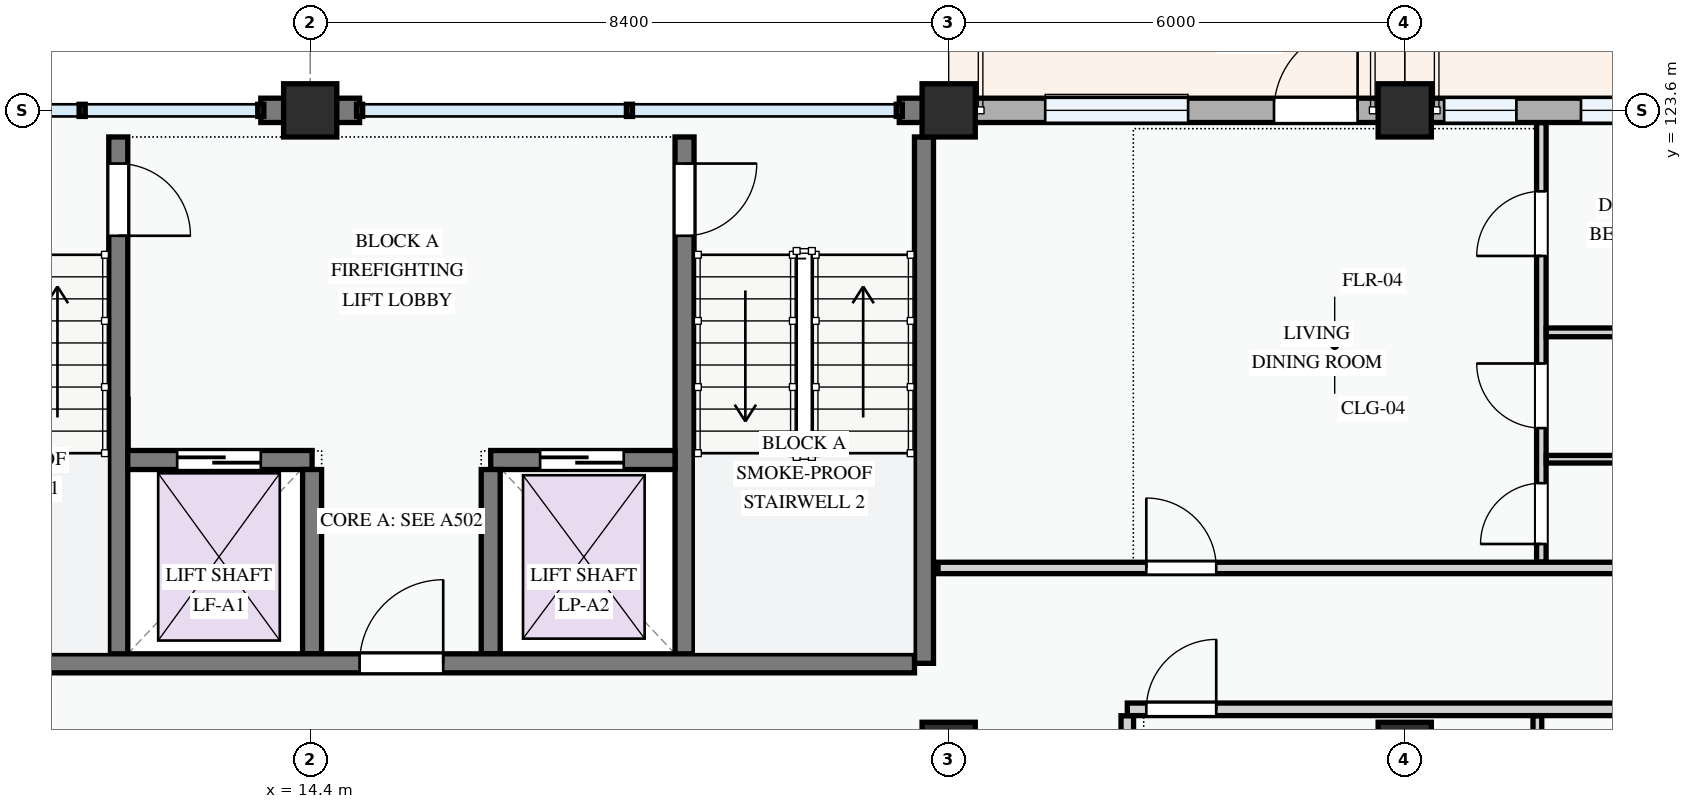
"""IFC4 building model, lengths in metres.
Left out: names, types, materials, properties, quantities, classifications, styles, units other than length and angle.
Written with IfcOpenShell. Run it as: python <this file> out.ifc"""

import sys

from ifc_helpers import new_model, si_unit, direction, frame, frame_2d, origin, origin_2d, place, context, subcontext, project, spatial, rectangle, extrude, element, fill, save


model = new_model("IFC4")
c1 = context("Model", 3, precision=1e-05, world=origin(), true_north=direction((0.0, 1.0)))
c2 = subcontext(c1, "Body", "Model", "MODEL_VIEW")
j1 = project(units=[si_unit("LENGTHUNIT", "METRE"), si_unit("PLANEANGLEUNIT", "RADIAN")], contexts=[c1])
p1 = place(None, origin())
s1 = spatial("IfcSite", under=j1, at=p1, CompositionType="ELEMENT")
p2 = place(p1, origin())
s2 = spatial("IfcBuilding", under=s1, at=p2, CompositionType="ELEMENT")
p3 = place(p2, frame((0.0, 0.0, 21.3)))
s3 = spatial("IfcBuildingStorey", under=s2, at=p3, CompositionType="ELEMENT", Elevation=21.3)
for number, where, z_axis, x_axis in (
    (1, (14.4, 123.6, 0.0), (0.0, 0.0, 1.0), (1.0, 0.0, 0.0)),
    (2, (22.8, 115.2, 0.0), (0.0, 0.0, 1.0), (1.0, 0.0, 0.0)),
    (3, (22.8, 123.6, 0.0), (0.0, 0.0, 1.0), (1.0, 0.0, 0.0)),
    (4, (28.8, 115.2, 0.0), (0.0, 0.0, 1.0), (1.0, 0.0, 0.0)),
    (5, (28.8, 123.6, 0.0), (0.0, 0.0, 1.0), (1.0, 0.0, 0.0)),
):
    element("IfcColumn", number, at=place(p3, frame(where, z_axis=z_axis, x_axis=x_axis)), inside=s3, PredefinedType="COLUMN", context=c2, shape_type="SweptSolid", body=[
        extrude(rectangle(XDim=0.7, YDim=0.7, at=origin_2d()), origin(), (0.0, 0.0, 1.0), 3.3),
    ])
p4 = place(p3, frame((37.2, 123.6, 0.0), z_axis=(0.0, 0.0, 1.0), x_axis=(-1.0, 0.0, 0.0)))
e6 = element("IfcWall", 6, at=p4, inside=s3, PredefinedType="STANDARD", context=c2, shape_type="SweptSolid", body=[
    extrude(rectangle(XDim=8.4, YDim=0.32, at=frame_2d((4.2, 0.0))), origin(), (0.0, 0.0, 1.0), 2.345),
])
p5 = place(p4, frame((2.711, 0.0, 0.0)))
e7 = element("IfcOpeningElement", 7, at=p5, cuts=e6, PredefinedType="OPENING", context=c2, shape_type="SweptSolid", body=[
    extrude(rectangle(XDim=1.05, YDim=2.15, at=frame_2d((0.525, 1.075))), frame((0.0, 0.17, 0.0), z_axis=(0.0, -1.0, 0.0), x_axis=(1.0, 0.0, 0.0)), (0.0, 0.0, 1.0), 0.34),
])
p6 = place(p4, frame((0.552, 0.0, 0.78)))
e8 = element("IfcOpeningElement", 8, at=p6, cuts=e6, PredefinedType="OPENING", context=c2, shape_type="SweptSolid", body=[
    extrude(rectangle(XDim=0.9, YDim=1.2, at=frame_2d((0.45, 0.6))), frame((0.0, 0.17, 0.0), z_axis=(0.0, -1.0, 0.0), x_axis=(1.0, 0.0, 0.0)), (0.0, 0.0, 1.0), 0.34),
])
p7 = place(p4, frame((5.181, 0.0, 0.78)))
e9 = element("IfcOpeningElement", 9, at=p7, cuts=e6, PredefinedType="OPENING", context=c2, shape_type="SweptSolid", body=[
    extrude(rectangle(XDim=0.9, YDim=1.2, at=frame_2d((0.45, 0.6))), frame((0.0, 0.17, 0.0), z_axis=(0.0, -1.0, 0.0), x_axis=(1.0, 0.0, 0.0)), (0.0, 0.0, 1.0), 0.34),
])
p8 = place(p4, frame((6.931, 0.0, 0.78)))
e10 = element("IfcOpeningElement", 10, at=p8, cuts=e6, PredefinedType="OPENING", context=c2, shape_type="SweptSolid", body=[
    extrude(rectangle(XDim=0.95, YDim=1.15, at=frame_2d((0.475, 0.575))), frame((0.0, 0.17, 0.0), z_axis=(0.0, -1.0, 0.0), x_axis=(1.0, 0.0, 0.0)), (0.0, 0.0, 1.0), 0.34),
])
p9 = place(p3, frame((28.8, 123.6, 0.0), z_axis=(0.0, 0.0, 1.0), x_axis=(-1.0, 0.0, 0.0)))
e11 = element("IfcWall", 11, at=p9, inside=s3, PredefinedType="STANDARD", context=c2, shape_type="SweptSolid", body=[
    extrude(rectangle(XDim=6.0, YDim=0.32, at=frame_2d((3.0, 0.0))), origin(), (0.0, 0.0, 1.0), 2.445),
])
p10 = place(p9, frame((0.62, 0.0, 0.0)))
e12 = element("IfcOpeningElement", 12, at=p10, cuts=e11, PredefinedType="OPENING", context=c2, shape_type="SweptSolid", body=[
    extrude(rectangle(XDim=1.1, YDim=2.15, at=frame_2d((0.55, 1.075))), frame((0.0, 0.17, 0.0), z_axis=(0.0, -1.0, 0.0), x_axis=(1.0, 0.0, 0.0)), (0.0, 0.0, 1.0), 0.34),
])
p11 = place(p9, frame((2.85, 0.0, 0.78)))
e13 = element("IfcOpeningElement", 13, at=p11, cuts=e11, PredefinedType="OPENING", context=c2, shape_type="SweptSolid", body=[
    extrude(rectangle(XDim=1.88, YDim=1.52, at=frame_2d((0.94, 0.76))), frame((0.0, 0.17, 0.0), z_axis=(0.0, -1.0, 0.0), x_axis=(1.0, 0.0, 0.0)), (0.0, 0.0, 1.0), 0.34),
])
for number, where, z_axis, x_axis in (
    (14, (22.8, 123.6, 0.0), (0.0, 0.0, 1.0), (-1.0, 0.0, 0.0)),
    (15, (15.05, 123.6, 0.0), (0.0, 0.0, 1.0), (-1.0, 0.0, 0.0)),
):
    element("IfcWall", number, at=place(p3, frame(where, z_axis=z_axis, x_axis=x_axis)), inside=s3, PredefinedType="STANDARD", context=c2, shape_type="SweptSolid", body=[
        extrude(rectangle(XDim=0.65, YDim=0.32, at=frame_2d((0.325, 0.0))), origin(), (0.0, 0.0, 1.0), 3.04),
    ])
p12 = place(p3, frame((14.4, 123.6, 0.0), z_axis=(0.0, 0.0, 1.0), x_axis=(-1.0, 0.0, 0.0)))
e16 = element("IfcWall", 16, at=p12, inside=s3, PredefinedType="STANDARD", context=c2, shape_type="SweptSolid", body=[
    extrude(rectangle(XDim=0.65, YDim=0.32, at=frame_2d((0.325, 0.0))), origin(), (0.0, 0.0, 1.0), 3.04),
])
p13 = place(p3, frame((11.875, 123.25, 0.0), z_axis=(0.0, 0.0, 1.0), x_axis=(0.0, -1.0, 0.0)))
e17 = element("IfcWall", 17, at=p13, inside=s3, PredefinedType="SHEAR", context=c2, shape_type="SweptSolid", body=[
    extrude(rectangle(XDim=6.925, YDim=0.25, at=frame_2d((3.462, 0.0))), origin(), (0.0, 0.0, 1.0), 3.0),
])
p14 = place(p13, frame((0.35, 0.0, 0.0)))
e18 = element("IfcOpeningElement", 18, at=p14, cuts=e17, PredefinedType="OPENING", context=c2, shape_type="SweptSolid", body=[
    extrude(rectangle(XDim=0.95, YDim=2.1, at=frame_2d((0.475, 1.05))), frame((0.0, 0.135, 0.0), z_axis=(0.0, -1.0, 0.0), x_axis=(1.0, 0.0, 0.0)), (0.0, 0.0, 1.0), 0.27),
])
p15 = place(p3, frame((22.475, 123.25, 0.0), z_axis=(0.0, 0.0, 1.0), x_axis=(0.0, -1.0, 0.0)))
e19 = element("IfcWall", 19, at=p15, inside=s3, PredefinedType="SHEAR", context=c2, shape_type="SweptSolid", body=[
    extrude(rectangle(XDim=6.925, YDim=0.25, at=frame_2d((3.462, 0.0))), origin(), (0.0, 0.0, 1.0), 3.0),
])
p16 = place(p3, frame((19.325, 123.25, 0.0), z_axis=(0.0, 0.0, 1.0), x_axis=(0.0, -1.0, 0.0)))
e20 = element("IfcWall", 20, at=p16, inside=s3, PredefinedType="SHEAR", context=c2, shape_type="SweptSolid", body=[
    extrude(rectangle(XDim=6.925, YDim=0.25, at=frame_2d((3.462, 0.0))), origin(), (0.0, 0.0, 1.0), 3.0),
])
p17 = place(p16, frame((0.35, 0.0, 0.0)))
e21 = element("IfcOpeningElement", 21, at=p17, cuts=e20, PredefinedType="OPENING", context=c2, shape_type="SweptSolid", body=[
    extrude(rectangle(XDim=0.95, YDim=2.1, at=frame_2d((0.475, 1.05))), frame((0.0, 0.135, 0.0), z_axis=(0.0, -1.0, 0.0), x_axis=(1.0, 0.0, 0.0)), (0.0, 0.0, 1.0), 0.27),
])
p18 = place(p3, frame((12.0, 119.0, 0.0), z_axis=(0.0, 0.0, 1.0), x_axis=(1.0, 0.0, 0.0)))
e22 = element("IfcWall", 22, at=p18, inside=s3, PredefinedType="SHEAR", context=c2, shape_type="SweptSolid", body=[
    extrude(rectangle(XDim=2.425, YDim=0.25, at=frame_2d((1.212, 0.0))), origin(), (0.0, 0.0, 1.0), 3.0),
])
p19 = place(p18, frame((0.65, 0.0, 0.0)))
e23 = element("IfcOpeningElement", 23, at=p19, cuts=e22, PredefinedType="OPENING", context=c2, shape_type="SweptSolid", body=[
    extrude(rectangle(XDim=1.1, YDim=2.15, at=frame_2d((0.55, 1.075))), frame((0.0, 0.135, 0.0), z_axis=(0.0, -1.0, 0.0), x_axis=(1.0, 0.0, 0.0)), (0.0, 0.0, 1.0), 0.27),
])
p20 = place(p3, frame((16.775, 119.0, 0.0), z_axis=(0.0, 0.0, 1.0), x_axis=(1.0, 0.0, 0.0)))
e24 = element("IfcWall", 24, at=p20, inside=s3, PredefinedType="SHEAR", context=c2, shape_type="SweptSolid", body=[
    extrude(rectangle(XDim=2.425, YDim=0.25, at=frame_2d((1.212, 0.0))), origin(), (0.0, 0.0, 1.0), 3.0),
])
p21 = place(p20, frame((0.65, 0.0, 0.0)))
e25 = element("IfcOpeningElement", 25, at=p21, cuts=e24, PredefinedType="OPENING", context=c2, shape_type="SweptSolid", body=[
    extrude(rectangle(XDim=1.1, YDim=2.15, at=frame_2d((0.55, 1.075))), frame((0.0, 0.135, 0.0), z_axis=(0.0, -1.0, 0.0), x_axis=(1.0, 0.0, 0.0)), (0.0, 0.0, 1.0), 0.27),
])
for number, where, z_axis, x_axis in (
    (26, (14.425, 118.875, 0.0), (0.0, 0.0, 1.0), (0.0, -1.0, 0.0)),
    (27, (16.775, 118.875, 0.0), (0.0, 0.0, 1.0), (0.0, -1.0, 0.0)),
):
    element("IfcWall", number, at=place(p3, frame(where, z_axis=z_axis, x_axis=x_axis)), inside=s3, PredefinedType="SHEAR", context=c2, shape_type="SweptSolid", body=[
        extrude(rectangle(XDim=2.425, YDim=0.25, at=frame_2d((1.212, 0.0))), origin(), (0.0, 0.0, 1.0), 3.0),
    ])
p22 = place(p3, frame((8.85, 116.325, 0.0), z_axis=(0.0, 0.0, 1.0), x_axis=(1.0, 0.0, 0.0)))
e28 = element("IfcWall", 28, at=p22, inside=s3, PredefinedType="SHEAR", context=c2, shape_type="SweptSolid", body=[
    extrude(rectangle(XDim=13.5, YDim=0.25, at=frame_2d((6.75, 0.0))), origin(), (0.0, 0.0, 1.0), 3.0),
])
p23 = place(p22, frame((6.2, 0.0, 0.0)))
e29 = element("IfcOpeningElement", 29, at=p23, cuts=e28, PredefinedType="OPENING", context=c2, shape_type="SweptSolid", body=[
    extrude(rectangle(XDim=1.1, YDim=2.15, at=frame_2d((0.55, 1.075))), frame((0.0, 0.135, 0.0), z_axis=(0.0, -1.0, 0.0), x_axis=(1.0, 0.0, 0.0)), (0.0, 0.0, 1.0), 0.27),
])
p24 = place(p3, frame((25.15, 109.362, 0.0), z_axis=(0.0, 0.0, 1.0), x_axis=(0.0, 1.0, 0.0)))
e30 = element("IfcWall", 30, at=p24, inside=s3, PredefinedType="PARTITIONING", context=c2, shape_type="SweptSolid", body=[
    extrude(rectangle(XDim=6.273, YDim=0.165, at=frame_2d((3.137, 0.0))), origin(), (0.0, 0.0, 1.0), 3.0),
])
p25 = place(p3, frame((30.545, 109.362, 0.0), z_axis=(0.0, 0.0, 1.0), x_axis=(0.0, 1.0, 0.0)))
e31 = element("IfcWall", 31, at=p25, inside=s3, PredefinedType="PARTITIONING", context=c2, shape_type="SweptSolid", body=[
    extrude(rectangle(XDim=6.273, YDim=0.115, at=frame_2d((3.137, 0.0))), origin(), (0.0, 0.0, 1.0), 3.0),
])
p26 = place(p25, frame((1.023, 0.0, 0.0)))
e32 = element("IfcOpeningElement", 32, at=p26, cuts=e31, PredefinedType="OPENING", context=c2, shape_type="SweptSolid", body=[
    extrude(rectangle(XDim=0.85, YDim=2.1, at=frame_2d((0.425, 1.05))), frame((0.0, 0.067, 0.0), z_axis=(0.0, -1.0, 0.0), x_axis=(1.0, 0.0, 0.0)), (0.0, 0.0, 1.0), 0.135),
])
p27 = place(p25, frame((3.478, 0.0, 0.0)))
e33 = element("IfcOpeningElement", 33, at=p27, cuts=e31, PredefinedType="OPENING", context=c2, shape_type="SweptSolid", body=[
    extrude(rectangle(XDim=0.85, YDim=2.1, at=frame_2d((0.425, 1.05))), frame((0.0, 0.067, 0.0), z_axis=(0.0, -1.0, 0.0), x_axis=(1.0, 0.0, 0.0)), (0.0, 0.0, 1.0), 0.135),
])
p28 = place(p25, frame((5.183, 0.0, 0.0)))
e34 = element("IfcOpeningElement", 34, at=p28, cuts=e31, PredefinedType="OPENING", context=c2, shape_type="SweptSolid", body=[
    extrude(rectangle(XDim=0.8, YDim=2.1, at=frame_2d((0.4, 1.05))), frame((0.0, 0.067, 0.0), z_axis=(0.0, -1.0, 0.0), x_axis=(1.0, 0.0, 0.0)), (0.0, 0.0, 1.0), 0.135),
])
p29 = place(p3, frame((30.597, 117.657, 0.0), z_axis=(0.0, 0.0, 1.0), x_axis=(0.0, 1.0, 0.0)))
e35 = element("IfcWall", 35, at=p29, inside=s3, PredefinedType="PARTITIONING", context=c2, shape_type="SweptSolid", body=[
    extrude(rectangle(XDim=5.781, YDim=0.125, at=frame_2d((2.891, 0.0))), origin(), (0.0, 0.0, 1.0), 3.0),
])
p30 = place(p29, frame((0.238, 0.0, 0.0)))
e36 = element("IfcOpeningElement", 36, at=p30, cuts=e35, PredefinedType="OPENING", context=c2, shape_type="SweptSolid", body=[
    extrude(rectangle(XDim=0.8, YDim=2.1, at=frame_2d((0.4, 1.05))), frame((0.0, 0.073, 0.0), z_axis=(0.0, -1.0, 0.0), x_axis=(1.0, 0.0, 0.0)), (0.0, 0.0, 1.0), 0.145),
])
p31 = place(p29, frame((1.763, 0.0, 0.0)))
e37 = element("IfcOpeningElement", 37, at=p31, cuts=e35, PredefinedType="OPENING", context=c2, shape_type="SweptSolid", body=[
    extrude(rectangle(XDim=0.85, YDim=2.1, at=frame_2d((0.425, 1.05))), frame((0.0, 0.073, 0.0), z_axis=(0.0, -1.0, 0.0), x_axis=(1.0, 0.0, 0.0)), (0.0, 0.0, 1.0), 0.145),
])
p32 = place(p29, frame((4.028, 0.0, 0.0)))
e38 = element("IfcOpeningElement", 38, at=p32, cuts=e35, PredefinedType="OPENING", context=c2, shape_type="SweptSolid", body=[
    extrude(rectangle(XDim=0.85, YDim=2.1, at=frame_2d((0.425, 1.05))), frame((0.0, 0.073, 0.0), z_axis=(0.0, -1.0, 0.0), x_axis=(1.0, 0.0, 0.0)), (0.0, 0.0, 1.0), 0.145),
])
p33 = place(p3, frame((30.662, 120.679, 0.0), z_axis=(0.0, 0.0, 1.0), x_axis=(1.0, 0.0, 0.0)))
e39 = element("IfcWall", 39, at=p33, inside=s3, PredefinedType="PARTITIONING", context=c2, shape_type="SweptSolid", body=[
    extrude(rectangle(XDim=1.784, YDim=0.115, at=frame_2d((0.892, 0.0))), origin(), (0.0, 0.0, 1.0), 3.0),
])
p34 = place(p3, frame((30.662, 119.01, 0.0), z_axis=(0.0, 0.0, 1.0), x_axis=(1.0, 0.0, 0.0)))
e40 = element("IfcWall", 40, at=p34, inside=s3, PredefinedType="PARTITIONING", context=c2, shape_type="SweptSolid", body=[
    extrude(rectangle(XDim=1.784, YDim=0.1, at=frame_2d((0.892, 0.0))), origin(), (0.0, 0.0, 1.0), 3.0),
])
p35 = place(p3, frame((25.15, 115.72, 0.0), z_axis=(0.0, 0.0, 1.0), x_axis=(1.0, 0.0, 0.0)))
e41 = element("IfcWall", 41, at=p35, inside=s3, PredefinedType="PARTITIONING", context=c2, shape_type="SweptSolid", body=[
    extrude(rectangle(XDim=26.288, YDim=0.165, at=frame_2d((13.144, 0.0))), origin(), (0.0, 0.0, 1.0), 3.0),
])
p36 = place(p35, frame((0.25, 0.0, 0.0)))
e42 = element("IfcOpeningElement", 42, at=p36, cuts=e41, PredefinedType="OPENING", context=c2, shape_type="SweptSolid", body=[
    extrude(rectangle(XDim=0.92, YDim=2.1, at=frame_2d((0.46, 1.05))), frame((0.0, 0.093, 0.0), z_axis=(0.0, -1.0, 0.0), x_axis=(1.0, 0.0, 0.0)), (0.0, 0.0, 1.0), 0.185),
])
p37 = place(p35, frame((7.64, 0.0, 0.0)))
e43 = element("IfcOpeningElement", 43, at=p37, cuts=e41, PredefinedType="OPENING", context=c2, shape_type="SweptSolid", body=[
    extrude(rectangle(XDim=0.92, YDim=2.1, at=frame_2d((0.46, 1.05))), frame((0.0, 0.093, 0.0), z_axis=(0.0, -1.0, 0.0), x_axis=(1.0, 0.0, 0.0)), (0.0, 0.0, 1.0), 0.185),
])
p38 = place(p35, frame((15.03, 0.0, 0.0)))
e44 = element("IfcOpeningElement", 44, at=p38, cuts=e41, PredefinedType="OPENING", context=c2, shape_type="SweptSolid", body=[
    extrude(rectangle(XDim=0.96, YDim=2.12, at=frame_2d((0.48, 1.06))), frame((0.0, 0.093, 0.0), z_axis=(0.0, -1.0, 0.0), x_axis=(1.0, 0.0, 0.0)), (0.0, 0.0, 1.0), 0.185),
])
p39 = place(p3, frame((22.66, 117.58, 0.0), z_axis=(0.0, 0.0, 1.0), x_axis=(1.0, 0.0, 0.0)))
e45 = element("IfcWall", 45, at=p39, inside=s3, PredefinedType="PARTITIONING", context=c2, shape_type="SweptSolid", body=[
    extrude(rectangle(XDim=28.778, YDim=0.15, at=frame_2d((14.389, 0.0))), origin(), (0.0, 0.0, 1.0), 3.0),
])
p40 = place(p39, frame((2.74, 0.0, 0.0)))
e46 = element("IfcOpeningElement", 46, at=p40, cuts=e45, PredefinedType="OPENING", context=c2, shape_type="SweptSolid", body=[
    extrude(rectangle(XDim=0.92, YDim=2.1, at=frame_2d((0.46, 1.05))), frame((0.0, 0.085, 0.0), z_axis=(0.0, -1.0, 0.0), x_axis=(1.0, 0.0, 0.0)), (0.0, 0.0, 1.0), 0.17),
])
p41 = place(p39, frame((10.13, 0.0, 0.0)))
e47 = element("IfcOpeningElement", 47, at=p41, cuts=e45, PredefinedType="OPENING", context=c2, shape_type="SweptSolid", body=[
    extrude(rectangle(XDim=0.92, YDim=2.1, at=frame_2d((0.46, 1.05))), frame((0.0, 0.085, 0.0), z_axis=(0.0, -1.0, 0.0), x_axis=(1.0, 0.0, 0.0)), (0.0, 0.0, 1.0), 0.17),
])
p42 = place(p39, frame((17.52, 0.0, 0.0)))
e48 = element("IfcOpeningElement", 48, at=p42, cuts=e45, PredefinedType="OPENING", context=c2, shape_type="SweptSolid", body=[
    extrude(rectangle(XDim=0.92, YDim=2.1, at=frame_2d((0.46, 1.05))), frame((0.0, 0.085, 0.0), z_axis=(0.0, -1.0, 0.0), x_axis=(1.0, 0.0, 0.0)), (0.0, 0.0, 1.0), 0.17),
])
p43 = place(p7, origin())
e49 = element("IfcWindow", 49, at=p43, inside=s3, PartitioningType="SINGLE_PANEL", PredefinedType="WINDOW", context=c2, shape_type="SweptSolid", body=[
    extrude(rectangle(XDim=0.9, YDim=1.2, at=frame_2d((0.45, 0.6))), frame((0.0, 0.03, 0.0), z_axis=(0.0, -1.0, 0.0), x_axis=(1.0, 0.0, 0.0)), (0.0, 0.0, 1.0), 0.06),
])
fill(e9, e49)
p44 = place(p8, origin())
e50 = element("IfcWindow", 50, at=p44, inside=s3, PartitioningType="SINGLE_PANEL", PredefinedType="WINDOW", context=c2, shape_type="SweptSolid", body=[
    extrude(rectangle(XDim=0.95, YDim=1.15, at=frame_2d((0.475, 0.575))), frame((0.0, 0.03, 0.0), z_axis=(0.0, -1.0, 0.0), x_axis=(1.0, 0.0, 0.0)), (0.0, 0.0, 1.0), 0.06),
])
fill(e10, e50)
p45 = place(p10, frame((1.1, 0.0, 0.0), z_axis=(0.0, 0.0, 1.0), x_axis=(-1.0, 0.0, 0.0)))
e51 = element("IfcDoor", 51, at=p45, inside=s3, OperationType="SINGLE_SWING_RIGHT", PredefinedType="DOOR", context=c2, shape_type="SweptSolid", body=[
    extrude(rectangle(XDim=1.1, YDim=2.15, at=frame_2d((0.55, 1.075))), frame((0.0, 0.025, 0.0), z_axis=(0.0, -1.0, 0.0), x_axis=(1.0, 0.0, 0.0)), (0.0, 0.0, 1.0), 0.05),
])
fill(e12, e51)
p46 = place(p11, origin())
e52 = element("IfcWindow", 52, at=p46, inside=s3, PartitioningType="DOUBLE_PANEL_VERTICAL", PredefinedType="WINDOW", context=c2, shape_type="SweptSolid", body=[
    extrude(rectangle(XDim=1.88, YDim=1.52, at=frame_2d((0.94, 0.76))), frame((0.0, 0.03, 0.0), z_axis=(0.0, -1.0, 0.0), x_axis=(1.0, 0.0, 0.0)), (0.0, 0.0, 1.0), 0.06),
])
fill(e13, e52)
p47 = place(p14, origin())
e53 = element("IfcDoor", 53, at=p47, inside=s3, OperationType="SINGLE_SWING_RIGHT", PredefinedType="DOOR", context=c2, shape_type="SweptSolid", body=[
    extrude(rectangle(XDim=0.95, YDim=2.1, at=frame_2d((0.475, 1.05))), frame((0.0, 0.025, 0.0), z_axis=(0.0, -1.0, 0.0), x_axis=(1.0, 0.0, 0.0)), (0.0, 0.0, 1.0), 0.05),
])
fill(e18, e53)
p48 = place(p17, origin())
e54 = element("IfcDoor", 54, at=p48, inside=s3, OperationType="SINGLE_SWING_LEFT", PredefinedType="DOOR", context=c2, shape_type="SweptSolid", body=[
    extrude(rectangle(XDim=0.95, YDim=2.1, at=frame_2d((0.475, 1.05))), frame((0.0, 0.025, 0.0), z_axis=(0.0, -1.0, 0.0), x_axis=(1.0, 0.0, 0.0)), (0.0, 0.0, 1.0), 0.05),
])
fill(e21, e54)
p49 = place(p19, origin())
e55 = element("IfcDoor", 55, at=p49, inside=s3, OperationType="SLIDING_TO_LEFT", PredefinedType="DOOR", context=c2, shape_type="SweptSolid", body=[
    extrude(rectangle(XDim=1.1, YDim=2.15, at=frame_2d((0.55, 1.075))), frame((0.0, 0.025, 0.0), z_axis=(0.0, -1.0, 0.0), x_axis=(1.0, 0.0, 0.0)), (0.0, 0.0, 1.0), 0.05),
])
fill(e23, e55)
p50 = place(p21, origin())
e56 = element("IfcDoor", 56, at=p50, inside=s3, OperationType="SLIDING_TO_LEFT", PredefinedType="DOOR", context=c2, shape_type="SweptSolid", body=[
    extrude(rectangle(XDim=1.1, YDim=2.15, at=frame_2d((0.55, 1.075))), frame((0.0, 0.025, 0.0), z_axis=(0.0, -1.0, 0.0), x_axis=(1.0, 0.0, 0.0)), (0.0, 0.0, 1.0), 0.05),
])
fill(e25, e56)
p51 = place(p23, origin())
e57 = element("IfcDoor", 57, at=p51, inside=s3, OperationType="SINGLE_SWING_RIGHT", PredefinedType="DOOR", context=c2, shape_type="SweptSolid", body=[
    extrude(rectangle(XDim=1.1, YDim=2.15, at=frame_2d((0.55, 1.075))), frame((0.0, 0.025, 0.0), z_axis=(0.0, -1.0, 0.0), x_axis=(1.0, 0.0, 0.0)), (0.0, 0.0, 1.0), 0.05),
])
fill(e29, e57)
p52 = place(p30, origin())
e58 = element("IfcDoor", 58, at=p52, inside=s3, OperationType="SINGLE_SWING_LEFT", PredefinedType="DOOR", context=c2, shape_type="SweptSolid", body=[
    extrude(rectangle(XDim=0.8, YDim=2.1, at=frame_2d((0.4, 1.05))), frame((0.0, 0.025, 0.0), z_axis=(0.0, -1.0, 0.0), x_axis=(1.0, 0.0, 0.0)), (0.0, 0.0, 1.0), 0.05),
])
fill(e36, e58)
p53 = place(p31, origin())
e59 = element("IfcDoor", 59, at=p53, inside=s3, OperationType="SINGLE_SWING_RIGHT", PredefinedType="DOOR", context=c2, shape_type="SweptSolid", body=[
    extrude(rectangle(XDim=0.85, YDim=2.1, at=frame_2d((0.425, 1.05))), frame((0.0, 0.025, 0.0), z_axis=(0.0, -1.0, 0.0), x_axis=(1.0, 0.0, 0.0)), (0.0, 0.0, 1.0), 0.05),
])
fill(e37, e59)
p54 = place(p32, origin())
e60 = element("IfcDoor", 60, at=p54, inside=s3, OperationType="SINGLE_SWING_LEFT", PredefinedType="DOOR", context=c2, shape_type="SweptSolid", body=[
    extrude(rectangle(XDim=0.85, YDim=2.1, at=frame_2d((0.425, 1.05))), frame((0.0, 0.025, 0.0), z_axis=(0.0, -1.0, 0.0), x_axis=(1.0, 0.0, 0.0)), (0.0, 0.0, 1.0), 0.05),
])
fill(e38, e60)
p55 = place(p36, origin())
e61 = element("IfcDoor", 61, at=p55, inside=s3, OperationType="SINGLE_SWING_RIGHT", PredefinedType="DOOR", context=c2, shape_type="SweptSolid", body=[
    extrude(rectangle(XDim=0.92, YDim=2.1, at=frame_2d((0.46, 1.05))), frame((0.0, 0.025, 0.0), z_axis=(0.0, -1.0, 0.0), x_axis=(1.0, 0.0, 0.0)), (0.0, 0.0, 1.0), 0.05),
])
fill(e42, e61)
p56 = place(p40, origin())
e62 = element("IfcDoor", 62, at=p56, inside=s3, OperationType="SINGLE_SWING_LEFT", PredefinedType="DOOR", context=c2, shape_type="SweptSolid", body=[
    extrude(rectangle(XDim=0.92, YDim=2.1, at=frame_2d((0.46, 1.05))), frame((0.0, 0.025, 0.0), z_axis=(0.0, -1.0, 0.0), x_axis=(1.0, 0.0, 0.0)), (0.0, 0.0, 1.0), 0.05),
])
fill(e46, e62)
save(model, sys.argv[1])
